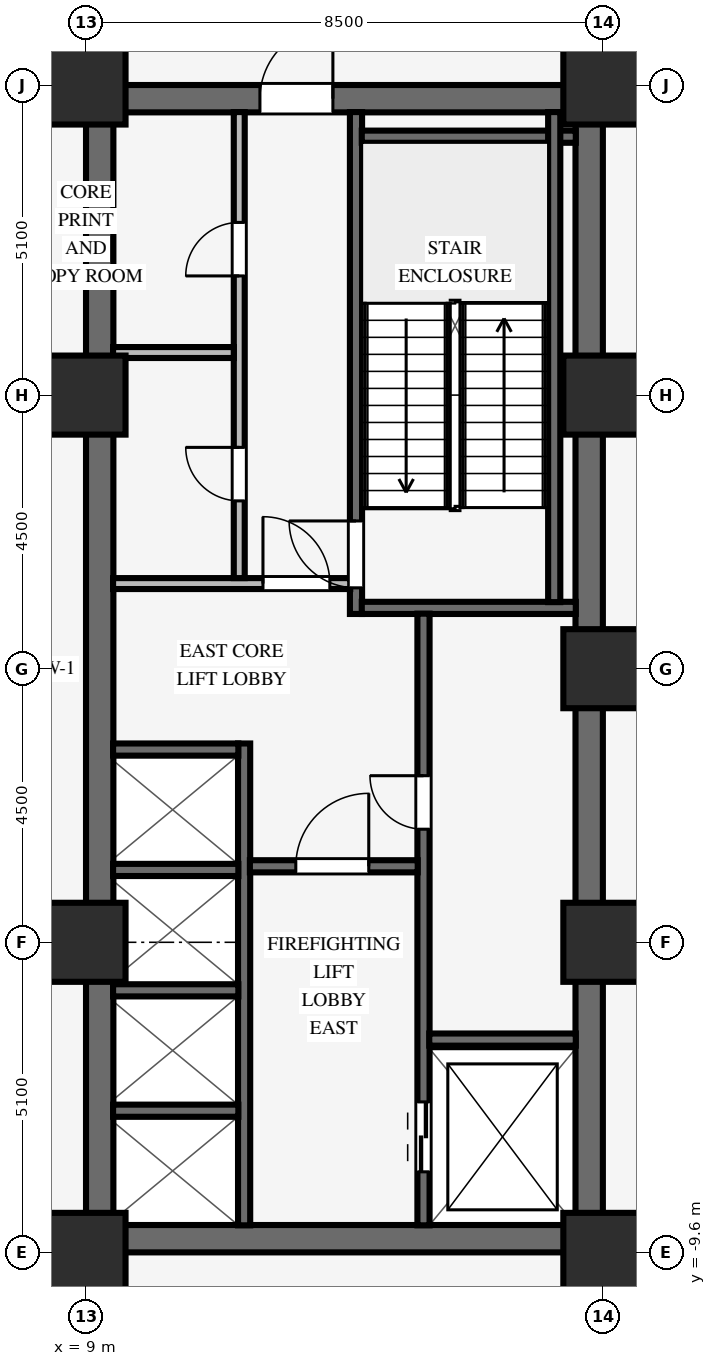
"""IFC4 building model, lengths in metres.
Left out: names, types, materials, properties, quantities, classifications, styles, units other than length and angle.
Written with IfcOpenShell. Run it as: python <this file> out.ifc"""

import sys

from ifc_helpers import new_model, si_unit, direction, frame, frame_2d, origin, origin_2d, place, context, subcontext, project, spatial, rectangle, extrude, source, transform, mapped, element, fill, save


model = new_model("IFC4")
c1 = context("Model", 3, precision=1e-05, world=origin(), true_north=direction((0.0, 1.0)))
c2 = subcontext(c1, "Body", "Model", "MODEL_VIEW")
j1 = project(units=[si_unit("LENGTHUNIT", "METRE"), si_unit("PLANEANGLEUNIT", "RADIAN")], contexts=[c1])
p1 = place(None, origin())
s1 = spatial("IfcSite", under=j1, at=p1, CompositionType="ELEMENT")
p2 = place(p1, origin())
s2 = spatial("IfcBuilding", under=s1, at=p2, CompositionType="ELEMENT")
p3 = place(p2, frame((0.0, 0.0, 4.6)))
s3 = spatial("IfcBuildingStorey", under=s2, at=p3, CompositionType="ELEMENT", Elevation=4.6)
p4 = place(p3, frame((9.0, -9.375, 0.0), z_axis=(0.0, 0.0, 1.0), x_axis=(1.0, 0.0, 0.0)))
e1 = element("IfcWall", 1, at=p4, inside=s3, PredefinedType="SHEAR", context=c2, shape_type="SweptSolid", body=[
    extrude(rectangle(XDim=8.5, YDim=0.45, at=frame_2d((4.25, 0.0))), origin(), (0.0, 0.0, 1.0), 4.28),
])
p5 = place(p3, frame((9.0, 9.375, 0.0), z_axis=(0.0, 0.0, 1.0), x_axis=(1.0, 0.0, 0.0)))
e2 = element("IfcWall", 2, at=p5, inside=s3, PredefinedType="SHEAR", context=c2, shape_type="SweptSolid", body=[
    extrude(rectangle(XDim=8.5, YDim=0.45, at=frame_2d((4.25, 0.0))), origin(), (0.0, 0.0, 1.0), 4.28),
])
p6 = place(p5, frame((2.86, 0.0, 0.0)))
e3 = element("IfcOpeningElement", 3, at=p6, cuts=e2, PredefinedType="OPENING", context=c2, shape_type="SweptSolid", body=[
    extrude(rectangle(XDim=1.2, YDim=2.15, at=frame_2d((0.6, 1.075))), frame((0.0, 0.235, 0.0), z_axis=(0.0, -1.0, 0.0), x_axis=(1.0, 0.0, 0.0)), (0.0, 0.0, 1.0), 0.47),
])
for number, where, z_axis, x_axis in (
    (4, (9.225, -9.155, 0.0), (0.0, 0.0, 1.0), (0.0, 1.0, 0.0)),
    (5, (17.275, -9.155, 0.0), (0.0, 0.0, 1.0), (0.0, 1.0, 0.0)),
):
    element("IfcWall", number, at=place(p3, frame(where, z_axis=z_axis, x_axis=x_axis)), inside=s3, PredefinedType="SHEAR", context=c2, shape_type="SweptSolid", body=[
        extrude(rectangle(XDim=18.31, YDim=0.45, at=frame_2d((9.155, 0.0))), origin(), (0.0, 0.0, 1.0), 4.28),
    ])
for number, where, z_axis, x_axis in (
    (6, (9.0, -9.6, 0.0), (0.0, 0.0, 1.0), (1.0, 0.0, 0.0)),
    (7, (9.0, -4.5, 0.0), (0.0, 0.0, 1.0), (1.0, 0.0, 0.0)),
    (8, (9.0, 4.5, 0.0), (0.0, 0.0, 1.0), (1.0, 0.0, 0.0)),
    (9, (9.0, 9.6, 0.0), (0.0, 0.0, 1.0), (1.0, 0.0, 0.0)),
    (10, (17.5, -9.6, 0.0), (0.0, 0.0, 1.0), (1.0, 0.0, 0.0)),
    (11, (17.5, -4.5, 0.0), (0.0, 0.0, 1.0), (1.0, 0.0, 0.0)),
    (12, (17.5, 4.5, 0.0), (0.0, 0.0, 1.0), (1.0, 0.0, 0.0)),
    (13, (17.5, 9.6, 0.0), (0.0, 0.0, 1.0), (1.0, 0.0, 0.0)),
    (14, (17.5, 0.0, 0.0), (0.0, 0.0, 1.0), (1.0, 0.0, 0.0)),
):
    element("IfcColumn", number, at=place(p3, frame(where, z_axis=z_axis, x_axis=x_axis)), inside=s3, PredefinedType="COLUMN", context=c2, shape_type="SweptSolid", body=[
        extrude(rectangle(XDim=1.3, YDim=1.3, at=origin_2d()), origin(), (0.0, 0.0, 1.0), 4.28),
    ])
p7 = place(p3, frame((13.44, 0.9, 0.0), z_axis=(0.0, 0.0, 1.0), x_axis=(0.0, 1.0, 0.0)))
e15 = element("IfcWall", 15, at=p7, inside=s3, PredefinedType="SHEAR", context=c2, shape_type="SweptSolid", body=[
    extrude(rectangle(XDim=8.255, YDim=0.2, at=frame_2d((4.127, 0.0))), origin(), (0.0, 0.0, 1.0), 4.28),
])
p8 = place(p7, frame((0.43, 0.0, 0.0)))
e16 = element("IfcOpeningElement", 16, at=p8, cuts=e15, PredefinedType="OPENING", context=c2, shape_type="SweptSolid", body=[
    extrude(rectangle(XDim=1.1, YDim=2.15, at=frame_2d((0.55, 1.075))), frame((0.0, 0.11, 0.0), z_axis=(0.0, -1.0, 0.0), x_axis=(1.0, 0.0, 0.0)), (0.0, 0.0, 1.0), 0.22),
])
for number, where, z_axis, x_axis in (
    (17, (13.535, 1.0, 0.0), (0.0, 0.0, 1.0), (1.0, 0.0, 0.0)),
    (18, (13.535, 8.75, 0.0), (0.0, 0.0, 1.0), (1.0, 0.0, 0.0)),
):
    element("IfcWall", number, at=place(p3, frame(where, z_axis=z_axis, x_axis=x_axis)), inside=s3, PredefinedType="SHEAR", context=c2, shape_type="SweptSolid", body=[
        extrude(rectangle(XDim=3.52, YDim=0.2, at=frame_2d((1.76, 0.0))), origin(), (0.0, 0.0, 1.0), 4.28),
    ])
p9 = place(p3, frame((16.7, 1.095, 0.0), z_axis=(0.0, 0.0, 1.0), x_axis=(0.0, 1.0, 0.0)))
e19 = element("IfcWall", 19, at=p9, inside=s3, PredefinedType="SHEAR", context=c2, shape_type="SweptSolid", body=[
    extrude(rectangle(XDim=8.06, YDim=0.2, at=frame_2d((4.03, 0.0))), origin(), (0.0, 0.0, 1.0), 4.28),
])
p10 = place(p3, frame((14.55, -9.155, 0.0), z_axis=(0.0, 0.0, 1.0), x_axis=(0.0, 1.0, 0.0)))
e20 = element("IfcWall", 20, at=p10, inside=s3, PredefinedType="SHEAR", context=c2, shape_type="SweptSolid", body=[
    extrude(rectangle(XDim=10.06, YDim=0.2, at=frame_2d((5.03, 0.0))), origin(), (0.0, 0.0, 1.0), 4.28),
])
p11 = place(p10, frame((6.515, 0.0, 0.0)))
e21 = element("IfcOpeningElement", 21, at=p11, cuts=e20, PredefinedType="OPENING", context=c2, shape_type="SweptSolid", body=[
    extrude(rectangle(XDim=0.88, YDim=2.1, at=frame_2d((0.44, 1.05))), frame((0.0, 0.11, 0.0), z_axis=(0.0, -1.0, 0.0), x_axis=(1.0, 0.0, 0.0)), (0.0, 0.0, 1.0), 0.22),
])
p12 = place(p10, frame((0.88, 0.0, 0.0)))
e22 = element("IfcOpeningElement", 22, at=p12, cuts=e20, PredefinedType="OPENING", context=c2, shape_type="SweptSolid", body=[
    extrude(rectangle(XDim=1.15, YDim=2.15, at=frame_2d((0.575, 1.075))), frame((0.0, 0.11, 0.0), z_axis=(0.0, -1.0, 0.0), x_axis=(1.0, 0.0, 0.0)), (0.0, 0.0, 1.0), 0.22),
])
p13 = place(p3, frame((14.645, -6.1, 0.0), z_axis=(0.0, 0.0, 1.0), x_axis=(1.0, 0.0, 0.0)))
e23 = element("IfcWall", 23, at=p13, inside=s3, PredefinedType="SHEAR", context=c2, shape_type="SweptSolid", body=[
    extrude(rectangle(XDim=2.41, YDim=0.2, at=frame_2d((1.205, 0.0))), origin(), (0.0, 0.0, 1.0), 4.28),
])
p14 = place(p3, frame((11.6, -9.155, 0.0), z_axis=(0.0, 0.0, 1.0), x_axis=(0.0, 1.0, 0.0)))
e24 = element("IfcWall", 24, at=p14, inside=s3, PredefinedType="SHEAR", context=c2, shape_type="SweptSolid", body=[
    extrude(rectangle(XDim=7.925, YDim=0.2, at=frame_2d((3.962, 0.0))), origin(), (0.0, 0.0, 1.0), 4.28),
])
p15 = place(p3, frame((11.695, -3.25, 0.0), z_axis=(0.0, 0.0, 1.0), x_axis=(1.0, 0.0, 0.0)))
e25 = element("IfcWall", 25, at=p15, inside=s3, PredefinedType="SHEAR", context=c2, shape_type="SweptSolid", body=[
    extrude(rectangle(XDim=2.76, YDim=0.2, at=frame_2d((1.38, 0.0))), origin(), (0.0, 0.0, 1.0), 4.28),
])
p16 = place(p15, frame((0.755, 0.0, 0.0)))
e26 = element("IfcOpeningElement", 26, at=p16, cuts=e25, PredefinedType="OPENING", context=c2, shape_type="SweptSolid", body=[
    extrude(rectangle(XDim=1.2, YDim=2.15, at=frame_2d((0.6, 1.075))), frame((0.0, 0.11, 0.0), z_axis=(0.0, -1.0, 0.0), x_axis=(1.0, 0.0, 0.0)), (0.0, 0.0, 1.0), 0.22),
])
for number, where, z_axis, x_axis in (
    (27, (9.445, -7.27, 0.0), (0.0, 0.0, 1.0), (1.0, 0.0, 0.0)),
    (28, (9.445, -5.29, 0.0), (0.0, 0.0, 1.0), (1.0, 0.0, 0.0)),
    (29, (9.445, -3.31, 0.0), (0.0, 0.0, 1.0), (1.0, 0.0, 0.0)),
    (30, (9.445, -1.33, 0.0), (0.0, 0.0, 1.0), (1.0, 0.0, 0.0)),
):
    element("IfcWall", number, at=place(p3, frame(where, z_axis=z_axis, x_axis=x_axis)), inside=s3, PredefinedType="SHEAR", context=c2, shape_type="SweptSolid", body=[
        extrude(rectangle(XDim=2.06, YDim=0.2, at=frame_2d((1.03, 0.0))), origin(), (0.0, 0.0, 1.0), 4.28),
    ])
p17 = place(p3, frame((9.445, 1.4, 0.0), z_axis=(0.0, 0.0, 1.0), x_axis=(1.0, 0.0, 0.0)))
e31 = element("IfcWall", 31, at=p17, inside=s3, PredefinedType="PARTITIONING", context=c2, shape_type="SweptSolid", body=[
    extrude(rectangle(XDim=3.9, YDim=0.18, at=frame_2d((1.95, 0.0))), origin(), (0.0, 0.0, 1.0), 4.27),
])
p18 = place(p17, frame((2.465, 0.0, 0.0)))
e32 = element("IfcOpeningElement", 32, at=p18, cuts=e31, PredefinedType="OPENING", context=c2, shape_type="SweptSolid", body=[
    extrude(rectangle(XDim=1.1, YDim=2.15, at=frame_2d((0.55, 1.075))), frame((0.0, 0.1, 0.0), z_axis=(0.0, -1.0, 0.0), x_axis=(1.0, 0.0, 0.0)), (0.0, 0.0, 1.0), 0.2),
])
p19 = place(p3, frame((11.52, 1.49, 0.0), z_axis=(0.0, 0.0, 1.0), x_axis=(0.0, 1.0, 0.0)))
e33 = element("IfcWall", 33, at=p19, inside=s3, PredefinedType="PARTITIONING", context=c2, shape_type="SweptSolid", body=[
    extrude(rectangle(XDim=7.665, YDim=0.18, at=frame_2d((3.833, 0.0))), origin(), (0.0, 0.0, 1.0), 4.27),
])
p20 = place(p19, frame((1.27, 0.0, 0.0)))
e34 = element("IfcOpeningElement", 34, at=p20, cuts=e33, PredefinedType="OPENING", context=c2, shape_type="SweptSolid", body=[
    extrude(rectangle(XDim=0.88, YDim=2.1, at=frame_2d((0.44, 1.05))), frame((0.0, 0.1, 0.0), z_axis=(0.0, -1.0, 0.0), x_axis=(1.0, 0.0, 0.0)), (0.0, 0.0, 1.0), 0.2),
])
p21 = place(p19, frame((4.97, 0.0, 0.0)))
e35 = element("IfcOpeningElement", 35, at=p21, cuts=e33, PredefinedType="OPENING", context=c2, shape_type="SweptSolid", body=[
    extrude(rectangle(XDim=0.88, YDim=2.1, at=frame_2d((0.44, 1.05))), frame((0.0, 0.1, 0.0), z_axis=(0.0, -1.0, 0.0), x_axis=(1.0, 0.0, 0.0)), (0.0, 0.0, 1.0), 0.2),
])
p22 = place(p3, frame((9.445, 5.2, 0.0), z_axis=(0.0, 0.0, 1.0), x_axis=(1.0, 0.0, 0.0)))
e36 = element("IfcWall", 36, at=p22, inside=s3, PredefinedType="PARTITIONING", context=c2, shape_type="SweptSolid", body=[
    extrude(rectangle(XDim=1.985, YDim=0.18, at=frame_2d((0.992, 0.0))), origin(), (0.0, 0.0, 1.0), 4.27),
])
m1 = source(origin(), c2, "Body", "SweptSolid", [
    extrude(rectangle(XDim=1.1, YDim=2.15, at=frame_2d((0.55, 1.075))), frame((0.0, 0.025, 0.0), z_axis=(0.0, -1.0, 0.0), x_axis=(1.0, 0.0, 0.0)), (0.0, 0.0, 1.0), 0.05),
])
p23 = place(p8, origin())
e37 = element("IfcDoor", 37, at=p23, inside=s3, OperationType="SINGLE_SWING_RIGHT", PredefinedType="DOOR", context=c2, shape_type="MappedRepresentation", body=[
    mapped(m1, transform((0.0, 0.0, 0.0), scale=1.0)),
])
fill(e16, e37)
m2 = source(origin(), c2, "Body", "SweptSolid", [
    extrude(rectangle(XDim=0.88, YDim=2.1, at=frame_2d((0.44, 1.05))), frame((0.0, 0.025, 0.0), z_axis=(0.0, -1.0, 0.0), x_axis=(1.0, 0.0, 0.0)), (0.0, 0.0, 1.0), 0.05),
])
p24 = place(p11, origin())
e38 = element("IfcDoor", 38, at=p24, inside=s3, OperationType="SINGLE_SWING_RIGHT", PredefinedType="DOOR", context=c2, shape_type="MappedRepresentation", body=[
    mapped(m2, transform((0.0, 0.0, 0.0), scale=1.0)),
])
fill(e21, e38)
m3 = source(origin(), c2, "Body", "SweptSolid", [
    extrude(rectangle(XDim=1.2, YDim=2.15, at=frame_2d((0.6, 1.075))), frame((0.0, 0.025, 0.0), z_axis=(0.0, -1.0, 0.0), x_axis=(1.0, 0.0, 0.0)), (0.0, 0.0, 1.0), 0.05),
])
p25 = place(p16, origin())
e39 = element("IfcDoor", 39, at=p25, inside=s3, OperationType="SINGLE_SWING_RIGHT", PredefinedType="DOOR", context=c2, shape_type="MappedRepresentation", body=[
    mapped(m3, transform((0.0, 0.0, 0.0), scale=1.0)),
])
fill(e26, e39)
p26 = place(p6, origin())
e40 = element("IfcDoor", 40, at=p26, inside=s3, OperationType="SINGLE_SWING_RIGHT", PredefinedType="DOOR", context=c2, shape_type="MappedRepresentation", body=[
    mapped(m3, transform((0.0, 0.0, 0.0), scale=1.0)),
])
fill(e3, e40)
p27 = place(p18, origin())
e41 = element("IfcDoor", 41, at=p27, inside=s3, OperationType="SINGLE_SWING_LEFT", PredefinedType="DOOR", context=c2, shape_type="MappedRepresentation", body=[
    mapped(m1, transform((0.0, 0.0, 0.0), scale=1.0)),
])
fill(e32, e41)
p28 = place(p20, origin())
e42 = element("IfcDoor", 42, at=p28, inside=s3, OperationType="SINGLE_SWING_RIGHT", PredefinedType="DOOR", context=c2, shape_type="MappedRepresentation", body=[
    mapped(m2, transform((0.0, 0.0, 0.0), scale=1.0)),
])
fill(e34, e42)
p29 = place(p21, origin())
e43 = element("IfcDoor", 43, at=p29, inside=s3, OperationType="SINGLE_SWING_LEFT", PredefinedType="DOOR", context=c2, shape_type="MappedRepresentation", body=[
    mapped(m2, transform((0.0, 0.0, 0.0), scale=1.0)),
])
fill(e35, e43)
m4 = source(origin(), c2, "Body", "SweptSolid", [
    extrude(rectangle(XDim=1.15, YDim=2.15, at=frame_2d((0.575, 1.075))), frame((0.0, 0.025, 0.0), z_axis=(0.0, -1.0, 0.0), x_axis=(1.0, 0.0, 0.0)), (0.0, 0.0, 1.0), 0.05),
])
p30 = place(p12, origin())
e44 = element("IfcDoor", 44, at=p30, inside=s3, OperationType="DOUBLE_DOOR_SLIDING", PredefinedType="DOOR", context=c2, shape_type="MappedRepresentation", body=[
    mapped(m4, transform((0.0, 0.0, 0.0), scale=1.0)),
])
fill(e22, e44)
save(model, sys.argv[1])
